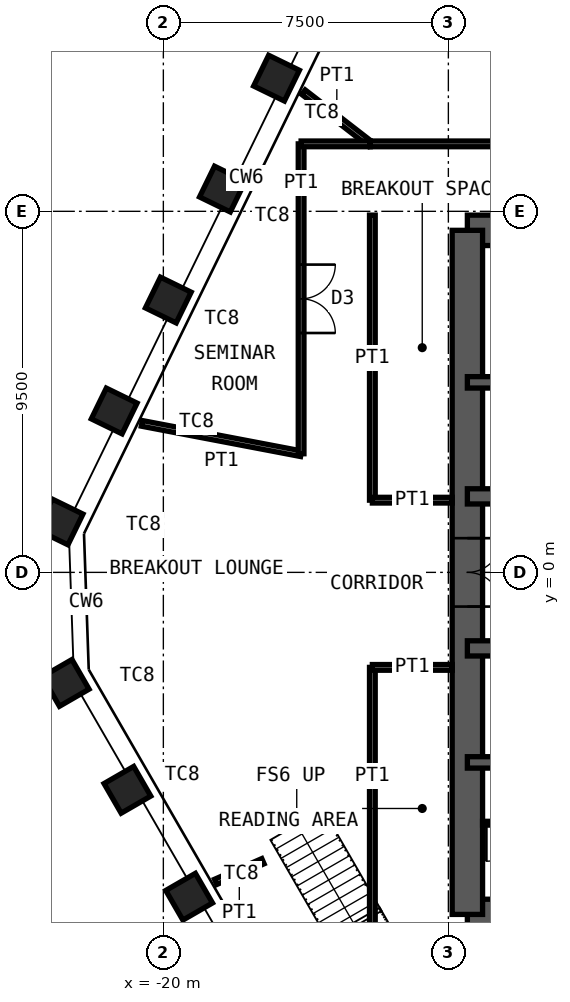
"""IFC4 building model, lengths in metres.
Left out: names, types, materials, properties, quantities, classifications, styles, units other than length and angle.
Written with IfcOpenShell. Run it as: python <this file> out.ifc"""

import sys

from ifc_helpers import new_model, si_unit, direction, frame, frame_2d, origin, origin_2d, place, context, subcontext, project, spatial, rectangle, hollow_rectangle, extrude, element, fill, save


model = new_model("IFC4")
c1 = context("Model", 3, precision=1e-05, world=origin(), true_north=direction((0.0, 1.0)))
c2 = subcontext(c1, "Body", "Model", "MODEL_VIEW")
j1 = project(units=[si_unit("LENGTHUNIT", "METRE"), si_unit("PLANEANGLEUNIT", "RADIAN")], contexts=[c1])
p1 = place(None, origin())
s1 = spatial("IfcSite", under=j1, at=p1, CompositionType="ELEMENT")
p2 = place(p1, origin())
s2 = spatial("IfcBuilding", under=s1, at=p2, CompositionType="ELEMENT")
p3 = place(p2, frame((0.0, 0.0, 329.2)))
s3 = spatial("IfcBuildingStorey", under=s2, at=p3, CompositionType="ELEMENT", Elevation=329.2)
for number, where, z_axis, x_axis in (
    (1, (-19.322, -8.534, 0.0), (0.0, 0.0, 1.0), (0.5, -0.866, 0.0)),
    (2, (-20.946, -5.721, 0.0), (0.0, 0.0, 1.0), (0.5, -0.866, 0.0)),
    (3, (-22.57, -2.908, 0.0), (0.0, 0.0, 1.0), (0.5, -0.866, 0.0)),
    (4, (-22.717, 1.327, 0.0), (0.0, 0.0, 1.0), (-0.438, -0.899, 0.0)),
    (5, (-21.293, 4.246, 0.0), (0.0, 0.0, 1.0), (-0.438, -0.899, 0.0)),
    (6, (-19.87, 7.166, 0.0), (0.0, 0.0, 1.0), (-0.438, -0.899, 0.0)),
    (7, (-18.446, 10.085, 0.0), (0.0, 0.0, 1.0), (-0.438, -0.899, 0.0)),
    (8, (-17.022, 13.004, 0.0), (0.0, 0.0, 1.0), (-0.438, -0.899, 0.0)),
):
    element("IfcColumn", number, at=place(p3, frame(where, z_axis=z_axis, x_axis=x_axis)), inside=s3, PredefinedType="COLUMN", context=c2, shape_type="SweptSolid", body=[
        extrude(hollow_rectangle(XDim=0.9, YDim=0.9, WallThickness=0.05, at=origin_2d()), origin(), (0.0, 0.0, 1.0), 4.2),
    ])
p4 = place(p3, frame((-12.0, 9.0, 0.0), z_axis=(0.0, 0.0, 1.0), x_axis=(1.0, 0.0, 0.0)))
e9 = element("IfcWall", 9, at=p4, inside=s3, PredefinedType="SHEAR", context=c2, shape_type="SweptSolid", body=[
    extrude(rectangle(XDim=24.0, YDim=0.8, at=frame_2d((12.0, 0.0))), origin(), (0.0, 0.0, 1.0), 4.2),
])
p5 = place(p4, frame((10.4, 0.0, 0.0)))
e10 = element("IfcOpeningElement", 10, at=p5, cuts=e9, PredefinedType="OPENING", context=c2, shape_type="SweptSolid", body=[
    extrude(rectangle(XDim=1.0, YDim=2.1, at=frame_2d((0.5, 1.05))), frame((0.0, 0.41, 0.0), z_axis=(0.0, -1.0, 0.0), x_axis=(1.0, 0.0, 0.0)), (0.0, 0.0, 1.0), 0.82),
])
p6 = place(p4, frame((17.6, 0.0, 0.0)))
e11 = element("IfcOpeningElement", 11, at=p6, cuts=e9, PredefinedType="OPENING", context=c2, shape_type="SweptSolid", body=[
    extrude(rectangle(XDim=0.9, YDim=2.1, at=frame_2d((0.45, 1.05))), frame((0.0, 0.41, 0.0), z_axis=(0.0, -1.0, 0.0), x_axis=(1.0, 0.0, 0.0)), (0.0, 0.0, 1.0), 0.82),
])
p7 = place(p4, frame((21.9, 0.0, 0.0)))
e12 = element("IfcOpeningElement", 12, at=p7, cuts=e9, PredefinedType="OPENING", context=c2, shape_type="SweptSolid", body=[
    extrude(rectangle(XDim=0.9, YDim=2.1, at=frame_2d((0.45, 1.05))), frame((0.0, 0.41, 0.0), z_axis=(0.0, -1.0, 0.0), x_axis=(1.0, 0.0, 0.0)), (0.0, 0.0, 1.0), 0.82),
])
p8 = place(p3, frame((-12.0, -9.0, 0.0), z_axis=(0.0, 0.0, 1.0), x_axis=(1.0, 0.0, 0.0)))
e13 = element("IfcWall", 13, at=p8, inside=s3, PredefinedType="SHEAR", context=c2, shape_type="SweptSolid", body=[
    extrude(rectangle(XDim=24.0, YDim=0.8, at=frame_2d((12.0, 0.0))), origin(), (0.0, 0.0, 1.0), 4.2),
])
p9 = place(p8, frame((1.35, 0.0, 0.0)))
e14 = element("IfcOpeningElement", 14, at=p9, cuts=e13, PredefinedType="OPENING", context=c2, shape_type="SweptSolid", body=[
    extrude(rectangle(XDim=1.0, YDim=2.1, at=frame_2d((0.5, 1.05))), frame((0.0, 0.41, 0.0), z_axis=(0.0, -1.0, 0.0), x_axis=(1.0, 0.0, 0.0)), (0.0, 0.0, 1.0), 0.82),
])
p10 = place(p8, frame((5.325, 0.0, 0.0)))
e15 = element("IfcOpeningElement", 15, at=p10, cuts=e13, PredefinedType="OPENING", context=c2, shape_type="SweptSolid", body=[
    extrude(rectangle(XDim=1.15, YDim=2.1, at=frame_2d((0.575, 1.05))), frame((0.0, 0.41, 0.0), z_axis=(0.0, -1.0, 0.0), x_axis=(1.0, 0.0, 0.0)), (0.0, 0.0, 1.0), 0.82),
])
p11 = place(p8, frame((12.6, 0.0, 0.0)))
e16 = element("IfcOpeningElement", 16, at=p11, cuts=e13, PredefinedType="OPENING", context=c2, shape_type="SweptSolid", body=[
    extrude(rectangle(XDim=1.0, YDim=2.1, at=frame_2d((0.5, 1.05))), frame((0.0, 0.41, 0.0), z_axis=(0.0, -1.0, 0.0), x_axis=(1.0, 0.0, 0.0)), (0.0, 0.0, 1.0), 0.82),
])
p12 = place(p3, frame((-12.0, -9.0, 0.0), z_axis=(0.0, 0.0, 1.0), x_axis=(0.0, 1.0, 0.0)))
e17 = element("IfcWall", 17, at=p12, inside=s3, PredefinedType="SHEAR", context=c2, shape_type="SweptSolid", body=[
    extrude(rectangle(XDim=18.0, YDim=0.8, at=frame_2d((9.0, 0.0))), origin(), (0.0, 0.0, 1.0), 4.2),
])
p13 = place(p12, frame((8.1, 0.0, 0.0)))
e18 = element("IfcOpeningElement", 18, at=p13, cuts=e17, PredefinedType="OPENING", context=c2, shape_type="SweptSolid", body=[
    extrude(rectangle(XDim=1.8, YDim=2.1, at=frame_2d((0.9, 1.05))), frame((0.0, 0.41, 0.0), z_axis=(0.0, -1.0, 0.0), x_axis=(1.0, 0.0, 0.0)), (0.0, 0.0, 1.0), 0.82),
])
p14 = place(p3, frame((-12.0, 5.0, 0.0), z_axis=(0.0, 0.0, 1.0), x_axis=(1.0, 0.0, 0.0)))
e19 = element("IfcWall", 19, at=p14, inside=s3, PredefinedType="SHEAR", context=c2, shape_type="SweptSolid", body=[
    extrude(rectangle(XDim=24.0, YDim=0.3, at=frame_2d((12.0, 0.0))), origin(), (0.0, 0.0, 1.0), 4.2),
])
p15 = place(p3, frame((-12.0, 2.0, 0.0), z_axis=(0.0, 0.0, 1.0), x_axis=(1.0, 0.0, 0.0)))
e20 = element("IfcWall", 20, at=p15, inside=s3, PredefinedType="SHEAR", context=c2, shape_type="SweptSolid", body=[
    extrude(rectangle(XDim=24.0, YDim=0.4, at=frame_2d((12.0, 0.0))), origin(), (0.0, 0.0, 1.0), 4.2),
])
p16 = place(p15, frame((2.4, 0.0, 0.0)))
e21 = element("IfcOpeningElement", 21, at=p16, cuts=e20, PredefinedType="OPENING", context=c2, shape_type="SweptSolid", body=[
    extrude(rectangle(XDim=1.1, YDim=2.1, at=frame_2d((0.55, 1.05))), frame((0.0, 0.21, 0.0), z_axis=(0.0, -1.0, 0.0), x_axis=(1.0, 0.0, 0.0)), (0.0, 0.0, 1.0), 0.42),
])
p17 = place(p15, frame((22.0, 0.0, 0.0)))
e22 = element("IfcOpeningElement", 22, at=p17, cuts=e20, PredefinedType="OPENING", context=c2, shape_type="SweptSolid", body=[
    extrude(rectangle(XDim=1.1, YDim=2.1, at=frame_2d((0.55, 1.05))), frame((0.0, 0.21, 0.0), z_axis=(0.0, -1.0, 0.0), x_axis=(1.0, 0.0, 0.0)), (0.0, 0.0, 1.0), 0.42),
])
p18 = place(p15, frame((10.15, 0.0, 0.0)))
e23 = element("IfcOpeningElement", 23, at=p18, cuts=e20, PredefinedType="OPENING", context=c2, shape_type="SweptSolid", body=[
    extrude(rectangle(XDim=1.0, YDim=2.1, at=frame_2d((0.5, 1.05))), frame((0.0, 0.21, 0.0), z_axis=(0.0, -1.0, 0.0), x_axis=(1.0, 0.0, 0.0)), (0.0, 0.0, 1.0), 0.42),
])
p19 = place(p15, frame((6.9, 0.0, 0.0)))
e24 = element("IfcOpeningElement", 24, at=p19, cuts=e20, PredefinedType="OPENING", context=c2, shape_type="SweptSolid", body=[
    extrude(rectangle(XDim=1.0, YDim=2.1, at=frame_2d((0.5, 1.05))), frame((0.0, 0.21, 0.0), z_axis=(0.0, -1.0, 0.0), x_axis=(1.0, 0.0, 0.0)), (0.0, 0.0, 1.0), 0.42),
])
p20 = place(p15, frame((13.35, 0.0, 0.0)))
e25 = element("IfcOpeningElement", 25, at=p20, cuts=e20, PredefinedType="OPENING", context=c2, shape_type="SweptSolid", body=[
    extrude(rectangle(XDim=1.1, YDim=2.4, at=frame_2d((0.55, 1.2))), frame((0.0, 0.21, 0.0), z_axis=(0.0, -1.0, 0.0), x_axis=(1.0, 0.0, 0.0)), (0.0, 0.0, 1.0), 0.42),
])
p21 = place(p15, frame((16.15, 0.0, 0.0)))
e26 = element("IfcOpeningElement", 26, at=p21, cuts=e20, PredefinedType="OPENING", context=c2, shape_type="SweptSolid", body=[
    extrude(rectangle(XDim=1.1, YDim=2.4, at=frame_2d((0.55, 1.2))), frame((0.0, 0.21, 0.0), z_axis=(0.0, -1.0, 0.0), x_axis=(1.0, 0.0, 0.0)), (0.0, 0.0, 1.0), 0.42),
])
p22 = place(p15, frame((19.0, 0.0, 0.0)))
e27 = element("IfcOpeningElement", 27, at=p22, cuts=e20, PredefinedType="OPENING", context=c2, shape_type="SweptSolid", body=[
    extrude(rectangle(XDim=1.0, YDim=2.1, at=frame_2d((0.5, 1.05))), frame((0.0, 0.21, 0.0), z_axis=(0.0, -1.0, 0.0), x_axis=(1.0, 0.0, 0.0)), (0.0, 0.0, 1.0), 0.42),
])
p23 = place(p3, frame((-12.0, -2.0, 0.0), z_axis=(0.0, 0.0, 1.0), x_axis=(1.0, 0.0, 0.0)))
e28 = element("IfcWall", 28, at=p23, inside=s3, PredefinedType="SHEAR", context=c2, shape_type="SweptSolid", body=[
    extrude(rectangle(XDim=24.0, YDim=0.4, at=frame_2d((12.0, 0.0))), origin(), (0.0, 0.0, 1.0), 4.2),
])
p24 = place(p23, frame((1.1, 0.0, 0.0)))
e29 = element("IfcOpeningElement", 29, at=p24, cuts=e28, PredefinedType="OPENING", context=c2, shape_type="SweptSolid", body=[
    extrude(rectangle(XDim=1.1, YDim=2.1, at=frame_2d((0.55, 1.05))), frame((0.0, 0.21, 0.0), z_axis=(0.0, -1.0, 0.0), x_axis=(1.0, 0.0, 0.0)), (0.0, 0.0, 1.0), 0.42),
])
p25 = place(p23, frame((13.55, 0.0, 0.0)))
e30 = element("IfcOpeningElement", 30, at=p25, cuts=e28, PredefinedType="OPENING", context=c2, shape_type="SweptSolid", body=[
    extrude(rectangle(XDim=1.1, YDim=2.1, at=frame_2d((0.55, 1.05))), frame((0.0, 0.21, 0.0), z_axis=(0.0, -1.0, 0.0), x_axis=(1.0, 0.0, 0.0)), (0.0, 0.0, 1.0), 0.42),
])
p26 = place(p23, frame((20.7, 0.0, 0.0)))
e31 = element("IfcOpeningElement", 31, at=p26, cuts=e28, PredefinedType="OPENING", context=c2, shape_type="SweptSolid", body=[
    extrude(rectangle(XDim=1.1, YDim=2.1, at=frame_2d((0.55, 1.05))), frame((0.0, 0.21, 0.0), z_axis=(0.0, -1.0, 0.0), x_axis=(1.0, 0.0, 0.0)), (0.0, 0.0, 1.0), 0.42),
])
p27 = place(p23, frame((4.0, 0.0, 0.0)))
e32 = element("IfcOpeningElement", 32, at=p27, cuts=e28, PredefinedType="OPENING", context=c2, shape_type="SweptSolid", body=[
    extrude(rectangle(XDim=1.0, YDim=2.1, at=frame_2d((0.5, 1.05))), frame((0.0, 0.21, 0.0), z_axis=(0.0, -1.0, 0.0), x_axis=(1.0, 0.0, 0.0)), (0.0, 0.0, 1.0), 0.42),
])
p28 = place(p23, frame((6.8, 0.0, 0.0)))
e33 = element("IfcOpeningElement", 33, at=p28, cuts=e28, PredefinedType="OPENING", context=c2, shape_type="SweptSolid", body=[
    extrude(rectangle(XDim=1.0, YDim=2.1, at=frame_2d((0.5, 1.05))), frame((0.0, 0.21, 0.0), z_axis=(0.0, -1.0, 0.0), x_axis=(1.0, 0.0, 0.0)), (0.0, 0.0, 1.0), 0.42),
])
p29 = place(p23, frame((9.6, 0.0, 0.0)))
e34 = element("IfcOpeningElement", 34, at=p29, cuts=e28, PredefinedType="OPENING", context=c2, shape_type="SweptSolid", body=[
    extrude(rectangle(XDim=1.0, YDim=2.1, at=frame_2d((0.5, 1.05))), frame((0.0, 0.21, 0.0), z_axis=(0.0, -1.0, 0.0), x_axis=(1.0, 0.0, 0.0)), (0.0, 0.0, 1.0), 0.42),
])
p30 = place(p3, frame((-12.0, -5.0, 0.0), z_axis=(0.0, 0.0, 1.0), x_axis=(1.0, 0.0, 0.0)))
e35 = element("IfcWall", 35, at=p30, inside=s3, PredefinedType="SHEAR", context=c2, shape_type="SweptSolid", body=[
    extrude(rectangle(XDim=24.0, YDim=0.3, at=frame_2d((12.0, 0.0))), origin(), (0.0, 0.0, 1.0), 4.2),
])
p31 = place(p3, frame((-11.6, -6.6, 0.0), z_axis=(0.0, 0.0, 1.0), x_axis=(1.0, 0.0, 0.0)))
e36 = element("IfcWall", 36, at=p31, inside=s3, PredefinedType="PARTITIONING", context=c2, shape_type="SweptSolid", body=[
    extrude(rectangle(XDim=3.25, YDim=0.1, at=frame_2d((1.625, 0.0))), origin(), (0.0, 0.0, 1.0), 3.98),
])
p32 = place(p31, frame((0.1, 0.0, 0.0)))
e37 = element("IfcOpeningElement", 37, at=p32, cuts=e36, PredefinedType="OPENING", context=c2, shape_type="SweptSolid", body=[
    extrude(rectangle(XDim=1.0, YDim=2.4, at=frame_2d((0.5, 1.2))), frame((0.0, 0.06, 0.0), z_axis=(0.0, -1.0, 0.0), x_axis=(1.0, 0.0, 0.0)), (0.0, 0.0, 1.0), 0.12),
])
p33 = place(p3, frame((-16.314, 12.636, 0.0), z_axis=(0.0, 0.0, 1.0), x_axis=(0.790545318909, -0.612403542406, 0.0)))
e38 = element("IfcWall", 38, at=p33, inside=s3, PredefinedType="PARTITIONING", context=c2, shape_type="SweptSolid", body=[
    extrude(rectangle(XDim=2.223, YDim=0.15, at=frame_2d((1.111, 0.0))), origin(), (0.0, 0.0, 1.0), 3.33),
])
p34 = place(p3, frame((-14.556, 11.275, 0.0), z_axis=(0.0, 0.0, 1.0), x_axis=(1.0, 0.0, 0.0)))
e39 = element("IfcWall", 39, at=p34, inside=s3, PredefinedType="PARTITIONING", context=c2, shape_type="SweptSolid", body=[
    extrude(rectangle(XDim=10.405, YDim=0.15, at=frame_2d((5.203, 0.0))), origin(), (0.0, 0.0, 1.0), 4.03),
])
p35 = place(p34, frame((4.302, 0.0, 0.0)))
e40 = element("IfcOpeningElement", 40, at=p35, cuts=e39, PredefinedType="OPENING", context=c2, shape_type="SweptSolid", body=[
    extrude(rectangle(XDim=1.8, YDim=2.4, at=frame_2d((0.9, 1.2))), frame((0.0, 0.085, 0.0), z_axis=(0.0, -1.0, 0.0), x_axis=(1.0, 0.0, 0.0)), (0.0, 0.0, 1.0), 0.17),
])
p36 = place(p3, frame((-18.624, -8.144, 0.0), z_axis=(0.0, 0.0, 1.0), x_axis=(0.91615320959, 0.400828263172, 0.0)))
e41 = element("IfcWall", 41, at=p36, inside=s3, PredefinedType="PARTITIONING", context=c2, shape_type="SweptSolid", body=[
    extrude(rectangle(XDim=1.358, YDim=0.15, at=frame_2d((0.679, 0.0))), origin(), (0.0, 0.0, 1.0), 3.33),
])
p37 = place(p3, frame((-20.566, 3.921, 0.0), z_axis=(0.0, 0.0, 1.0), x_axis=(0.982305997167, -0.187283015595, 0.0)))
e42 = element("IfcWall", 42, at=p37, inside=s3, PredefinedType="PARTITIONING", context=c2, shape_type="SweptSolid", body=[
    extrude(rectangle(XDim=4.267, YDim=0.15, at=frame_2d((2.133, 0.0))), origin(), (0.0, 0.0, 1.0), 3.33),
])
p38 = place(p3, frame((-16.375, 3.122, 0.0), z_axis=(0.0, 0.0, 1.0), x_axis=(0.0, 1.0, 0.0)))
e43 = element("IfcWall", 43, at=p38, inside=s3, PredefinedType="PARTITIONING", context=c2, shape_type="SweptSolid", body=[
    extrude(rectangle(XDim=8.153, YDim=0.15, at=frame_2d((4.077, 0.0))), origin(), (0.0, 0.0, 1.0), 4.03),
])
p39 = place(p38, frame((3.177, 0.0, 0.0)))
e44 = element("IfcOpeningElement", 44, at=p39, cuts=e43, PredefinedType="OPENING", context=c2, shape_type="SweptSolid", body=[
    extrude(rectangle(XDim=1.8, YDim=2.4, at=frame_2d((0.9, 1.2))), frame((0.0, 0.085, 0.0), z_axis=(0.0, -1.0, 0.0), x_axis=(1.0, 0.0, 0.0)), (0.0, 0.0, 1.0), 0.17),
])
p40 = place(p3, frame((-16.375, 11.275, 0.0), z_axis=(0.0, 0.0, 1.0), x_axis=(1.0, 0.0, 0.0)))
e45 = element("IfcWall", 45, at=p40, inside=s3, PredefinedType="PARTITIONING", context=c2, shape_type="SweptSolid", body=[
    extrude(rectangle(XDim=1.819, YDim=0.15, at=frame_2d((0.909, 0.0))), origin(), (0.0, 0.0, 1.0), 4.03),
])
p41 = place(p3, frame((-14.5, 1.9, 0.0), z_axis=(0.0, 0.0, 1.0), x_axis=(0.0, 1.0, 0.0)))
e46 = element("IfcWall", 46, at=p41, inside=s3, PredefinedType="PARTITIONING", context=c2, shape_type="SweptSolid", body=[
    extrude(rectangle(XDim=7.5, YDim=0.15, at=frame_2d((3.75, 0.0))), origin(), (0.0, 0.0, 1.0), 4.03),
])
p42 = place(p3, frame((-12.4, 1.9, 0.0), z_axis=(0.0, 0.0, 1.0), x_axis=(-1.0, 0.0, 0.0)))
e47 = element("IfcWall", 47, at=p42, inside=s3, PredefinedType="PARTITIONING", context=c2, shape_type="SweptSolid", body=[
    extrude(rectangle(XDim=2.1, YDim=0.15, at=frame_2d((1.05, 0.0))), origin(), (0.0, 0.0, 1.0), 3.53),
])
p43 = place(p3, frame((-14.5, -9.4, 0.0), z_axis=(0.0, 0.0, 1.0), x_axis=(0.0, 1.0, 0.0)))
e48 = element("IfcWall", 48, at=p43, inside=s3, PredefinedType="PARTITIONING", context=c2, shape_type="SweptSolid", body=[
    extrude(rectangle(XDim=6.9, YDim=0.15, at=frame_2d((3.45, 0.0))), origin(), (0.0, 0.0, 1.0), 4.03),
])
p44 = place(p3, frame((-12.4, -2.5, 0.0), z_axis=(0.0, 0.0, 1.0), x_axis=(-1.0, 0.0, 0.0)))
e49 = element("IfcWall", 49, at=p44, inside=s3, PredefinedType="PARTITIONING", context=c2, shape_type="SweptSolid", body=[
    extrude(rectangle(XDim=2.1, YDim=0.15, at=frame_2d((1.05, 0.0))), origin(), (0.0, 0.0, 1.0), 3.53),
])
p45 = place(p13, origin())
e50 = element("IfcDoor", 50, at=p45, inside=s3, OperationType="DOUBLE_DOOR_DOUBLE_SWING", PredefinedType="DOOR", context=c2, shape_type="SweptSolid", body=[
    extrude(rectangle(XDim=1.8, YDim=2.1, at=frame_2d((0.9, 1.05))), frame((0.0, 0.025, 0.0), z_axis=(0.0, -1.0, 0.0), x_axis=(1.0, 0.0, 0.0)), (0.0, 0.0, 1.0), 0.05),
])
fill(e18, e50)
p46 = place(p32, origin())
e51 = element("IfcDoor", 51, at=p46, inside=s3, OperationType="SINGLE_SWING_LEFT", PredefinedType="DOOR", context=c2, shape_type="SweptSolid", body=[
    extrude(rectangle(XDim=1.0, YDim=2.4, at=frame_2d((0.5, 1.2))), frame((0.0, 0.025, 0.0), z_axis=(0.0, -1.0, 0.0), x_axis=(1.0, 0.0, 0.0)), (0.0, 0.0, 1.0), 0.05),
])
fill(e37, e51)
p47 = place(p39, origin())
e52 = element("IfcDoor", 52, at=p47, inside=s3, OperationType="DOUBLE_DOOR_DOUBLE_SWING", PredefinedType="DOOR", context=c2, shape_type="SweptSolid", body=[
    extrude(rectangle(XDim=1.8, YDim=2.4, at=frame_2d((0.9, 1.2))), frame((0.0, 0.025, 0.0), z_axis=(0.0, -1.0, 0.0), x_axis=(1.0, 0.0, 0.0)), (0.0, 0.0, 1.0), 0.05),
])
fill(e44, e52)
save(model, sys.argv[1])
